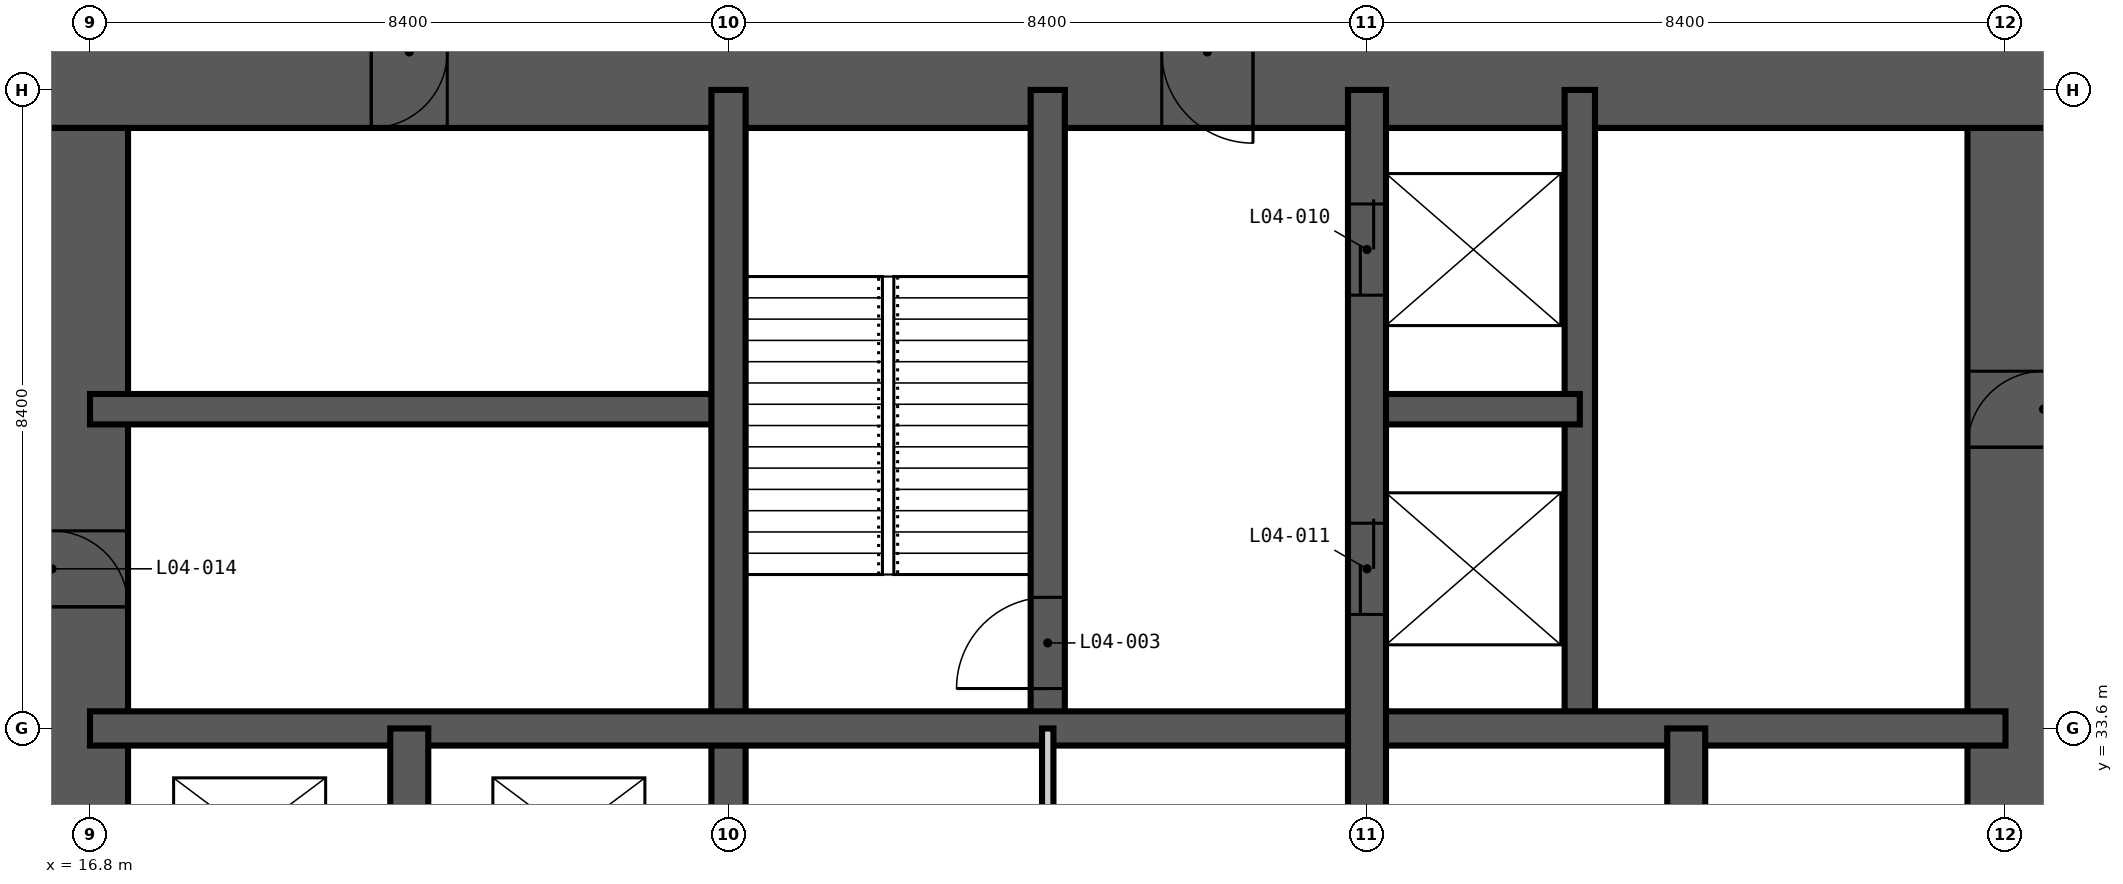
"""IFC4 building model, lengths in metres.
Left out: names, types, materials, properties, quantities, classifications, styles, units other than length and angle.
Written with IfcOpenShell. Run it as: python <this file> out.ifc"""

import sys

from ifc_helpers import new_model, si_unit, direction, frame, frame_2d, origin, place, context, subcontext, project, spatial, rectangle, extrude, element, fill, save


model = new_model("IFC4")
c1 = context("Model", 3, precision=1e-05, world=origin(), true_north=direction((0.0, 1.0)))
c2 = subcontext(c1, "Body", "Model", "MODEL_VIEW")
j1 = project(units=[si_unit("LENGTHUNIT", "METRE"), si_unit("PLANEANGLEUNIT", "RADIAN")], contexts=[c1])
p1 = place(None, origin())
s1 = spatial("IfcSite", under=j1, at=p1, CompositionType="ELEMENT")
p2 = place(p1, origin())
s2 = spatial("IfcBuilding", under=s1, at=p2, CompositionType="ELEMENT")
p3 = place(p2, frame((0.0, 0.0, 22.0)))
s3 = spatial("IfcBuildingStorey", under=s2, at=p3, CompositionType="ELEMENT", Elevation=22.0)
p4 = place(p3, frame((42.5, 17.3, -0.35), z_axis=(0.0, 0.0, 1.0), x_axis=(0.0, 1.0, 0.0)))
e1 = element("IfcWall", 1, at=p4, inside=s3, PredefinedType="SHEAR", context=c2, shape_type="SweptSolid", body=[
    extrude(rectangle(XDim=24.2, YDim=2.0, at=frame_2d((12.1, 0.0))), origin(), (0.0, 0.0, 1.0), 5.0),
])
p5 = place(p4, frame((0.3, 0.0, 0.35)))
e2 = element("IfcOpeningElement", 2, at=p5, cuts=e1, PredefinedType="OPENING", context=c2, shape_type="SweptSolid", body=[
    extrude(rectangle(XDim=1.2, YDim=2.2, at=frame_2d((0.6, 1.1))), frame((0.0, 1.01, 0.0), z_axis=(0.0, -1.0, 0.0), x_axis=(1.0, 0.0, 0.0)), (0.0, 0.0, 1.0), 2.02),
])
p6 = place(p4, frame((11.6, 0.0, 0.35)))
e3 = element("IfcOpeningElement", 3, at=p6, cuts=e1, PredefinedType="OPENING", context=c2, shape_type="SweptSolid", body=[
    extrude(rectangle(XDim=1.0, YDim=2.1, at=frame_2d((0.5, 1.05))), frame((0.0, 1.01, 0.0), z_axis=(0.0, -1.0, 0.0), x_axis=(1.0, 0.0, 0.0)), (0.0, 0.0, 1.0), 2.02),
])
p7 = place(p4, frame((20.0, 0.0, 0.35)))
e4 = element("IfcOpeningElement", 4, at=p7, cuts=e1, PredefinedType="OPENING", context=c2, shape_type="SweptSolid", body=[
    extrude(rectangle(XDim=1.0, YDim=2.1, at=frame_2d((0.5, 1.05))), frame((0.0, 1.01, 0.0), z_axis=(0.0, -1.0, 0.0), x_axis=(1.0, 0.0, 0.0)), (0.0, 0.0, 1.0), 2.02),
])
p8 = place(p3, frame((43.5, 42.5, -0.35), z_axis=(0.0, 0.0, 1.0), x_axis=(-1.0, 0.0, 0.0)))
e5 = element("IfcWall", 5, at=p8, inside=s3, PredefinedType="SHEAR", context=c2, shape_type="SweptSolid", body=[
    extrude(rectangle(XDim=28.2, YDim=2.0, at=frame_2d((14.1, 0.0))), origin(), (0.0, 0.0, 1.0), 5.0),
])
p9 = place(p8, frame((22.0, 0.0, 0.35)))
e6 = element("IfcOpeningElement", 6, at=p9, cuts=e5, PredefinedType="OPENING", context=c2, shape_type="SweptSolid", body=[
    extrude(rectangle(XDim=1.0, YDim=2.1, at=frame_2d((0.5, 1.05))), frame((0.0, 1.01, 0.0), z_axis=(0.0, -1.0, 0.0), x_axis=(1.0, 0.0, 0.0)), (0.0, 0.0, 1.0), 2.02),
])
p10 = place(p8, frame((11.4, 0.0, 0.35)))
e7 = element("IfcOpeningElement", 7, at=p10, cuts=e5, PredefinedType="OPENING", context=c2, shape_type="SweptSolid", body=[
    extrude(rectangle(XDim=1.2, YDim=2.2, at=frame_2d((0.6, 1.1))), frame((0.0, 1.01, 0.0), z_axis=(0.0, -1.0, 0.0), x_axis=(1.0, 0.0, 0.0)), (0.0, 0.0, 1.0), 2.02),
])
p11 = place(p3, frame((16.3, 41.5, -0.35), z_axis=(0.0, 0.0, 1.0), x_axis=(0.0, -1.0, 0.0)))
e8 = element("IfcWall", 8, at=p11, inside=s3, PredefinedType="SHEAR", context=c2, shape_type="SweptSolid", body=[
    extrude(rectangle(XDim=24.2, YDim=2.0, at=frame_2d((12.1, 0.0))), origin(), (0.0, 0.0, 1.0), 5.0),
])
p12 = place(p11, frame((11.2, 0.0, 0.35)))
e9 = element("IfcOpeningElement", 9, at=p12, cuts=e8, PredefinedType="OPENING", context=c2, shape_type="SweptSolid", body=[
    extrude(rectangle(XDim=1.8, YDim=2.2, at=frame_2d((0.9, 1.1))), frame((0.0, 1.01, 0.0), z_axis=(0.0, -1.0, 0.0), x_axis=(1.0, 0.0, 0.0)), (0.0, 0.0, 1.0), 2.02),
])
p13 = place(p11, frame((20.0, 0.0, 0.35)))
e10 = element("IfcOpeningElement", 10, at=p13, cuts=e8, PredefinedType="OPENING", context=c2, shape_type="SweptSolid", body=[
    extrude(rectangle(XDim=1.0, YDim=2.1, at=frame_2d((0.5, 1.05))), frame((0.0, 1.01, 0.0), z_axis=(0.0, -1.0, 0.0), x_axis=(1.0, 0.0, 0.0)), (0.0, 0.0, 1.0), 2.02),
])
p14 = place(p11, frame((5.3, 0.0, 0.35)))
e11 = element("IfcOpeningElement", 11, at=p14, cuts=e8, PredefinedType="OPENING", context=c2, shape_type="SweptSolid", body=[
    extrude(rectangle(XDim=1.0, YDim=2.1, at=frame_2d((0.5, 1.05))), frame((0.0, 1.01, 0.0), z_axis=(0.0, -1.0, 0.0), x_axis=(1.0, 0.0, 0.0)), (0.0, 0.0, 1.0), 2.02),
])
for number, where, z_axis, x_axis in (
    (12, (36.4, 33.6, -0.35), (0.0, 0.0, 1.0), (0.0, 1.0, 0.0)),
    (13, (16.8, 37.8, -0.35), (0.0, 0.0, 1.0), (1.0, 0.0, 0.0)),
):
    element("IfcWall", number, at=place(p3, frame(where, z_axis=z_axis, x_axis=x_axis)), inside=s3, PredefinedType="SHEAR", context=c2, shape_type="SweptSolid", body=[
        extrude(rectangle(XDim=8.4, YDim=0.4, at=frame_2d((4.2, 0.0))), origin(), (0.0, 0.0, 1.0), 5.0),
    ])
p15 = place(p3, frame((33.6, 37.8, -0.35), z_axis=(0.0, 0.0, 1.0), x_axis=(1.0, 0.0, 0.0)))
e14 = element("IfcWall", 14, at=p15, inside=s3, PredefinedType="SHEAR", context=c2, shape_type="SweptSolid", body=[
    extrude(rectangle(XDim=2.8, YDim=0.4, at=frame_2d((1.4, 0.0))), origin(), (0.0, 0.0, 1.0), 5.0),
])
p16 = place(p3, frame((25.2, 16.8, -0.35), z_axis=(0.0, 0.0, 1.0), x_axis=(0.0, 1.0, 0.0)))
e15 = element("IfcWall", 15, at=p16, inside=s3, PredefinedType="SHEAR", context=c2, shape_type="SweptSolid", body=[
    extrude(rectangle(XDim=25.2, YDim=0.45, at=frame_2d((12.6, 0.0))), origin(), (0.0, 0.0, 1.0), 5.0),
])
p17 = place(p3, frame((29.4, 33.6, -0.35), z_axis=(0.0, 0.0, 1.0), x_axis=(0.0, 1.0, 0.0)))
e16 = element("IfcWall", 16, at=p17, inside=s3, PredefinedType="SHEAR", context=c2, shape_type="SweptSolid", body=[
    extrude(rectangle(XDim=8.4, YDim=0.45, at=frame_2d((4.2, 0.0))), origin(), (0.0, 0.0, 1.0), 5.0),
])
p18 = place(p17, frame((0.525, 0.0, 0.35)))
e17 = element("IfcOpeningElement", 17, at=p18, cuts=e16, PredefinedType="OPENING", context=c2, shape_type="SweptSolid", body=[
    extrude(rectangle(XDim=1.2, YDim=2.2, at=frame_2d((0.6, 1.1))), frame((0.0, 0.235, 0.0), z_axis=(0.0, -1.0, 0.0), x_axis=(1.0, 0.0, 0.0)), (0.0, 0.0, 1.0), 0.47),
])
p19 = place(p3, frame((16.8, 33.6, -0.35), z_axis=(0.0, 0.0, 1.0), x_axis=(1.0, 0.0, 0.0)))
e18 = element("IfcWall", 18, at=p19, inside=s3, PredefinedType="SHEAR", context=c2, shape_type="SweptSolid", body=[
    extrude(rectangle(XDim=25.2, YDim=0.45, at=frame_2d((12.6, 0.0))), origin(), (0.0, 0.0, 1.0), 5.0),
])
p20 = place(p3, frame((21.0, 30.8, -0.35), z_axis=(0.0, 0.0, 1.0), x_axis=(0.0, 1.0, 0.0)))
e19 = element("IfcWall", 19, at=p20, inside=s3, PredefinedType="SHEAR", context=c2, shape_type="SweptSolid", body=[
    extrude(rectangle(XDim=2.8, YDim=0.5, at=frame_2d((1.4, 0.0))), origin(), (0.0, 0.0, 1.0), 5.0),
])
p21 = place(p3, frame((33.6, 16.8, -0.35), z_axis=(0.0, 0.0, 1.0), x_axis=(0.0, 1.0, 0.0)))
e20 = element("IfcWall", 20, at=p21, inside=s3, PredefinedType="SHEAR", context=c2, shape_type="SweptSolid", body=[
    extrude(rectangle(XDim=25.2, YDim=0.5, at=frame_2d((12.6, 0.0))), origin(), (0.0, 0.0, 1.0), 5.0),
])
p22 = place(p21, frame((22.5, 0.0, 0.35)))
e21 = element("IfcOpeningElement", 21, at=p22, cuts=e20, PredefinedType="OPENING", context=c2, shape_type="SweptSolid", body=[
    extrude(rectangle(XDim=1.2, YDim=2.2, at=frame_2d((0.6, 1.1))), frame((0.0, 0.26, 0.0), z_axis=(0.0, -1.0, 0.0), x_axis=(1.0, 0.0, 0.0)), (0.0, 0.0, 1.0), 0.52),
])
p23 = place(p21, frame((18.3, 0.0, 0.35)))
e22 = element("IfcOpeningElement", 22, at=p23, cuts=e20, PredefinedType="OPENING", context=c2, shape_type="SweptSolid", body=[
    extrude(rectangle(XDim=1.2, YDim=2.2, at=frame_2d((0.6, 1.1))), frame((0.0, 0.26, 0.0), z_axis=(0.0, -1.0, 0.0), x_axis=(1.0, 0.0, 0.0)), (0.0, 0.0, 1.0), 0.52),
])
p24 = place(p21, frame((12.1, 0.0, 0.35)))
e23 = element("IfcOpeningElement", 23, at=p24, cuts=e20, PredefinedType="OPENING", context=c2, shape_type="SweptSolid", body=[
    extrude(rectangle(XDim=1.0, YDim=2.1, at=frame_2d((0.5, 1.05))), frame((0.0, 0.26, 0.0), z_axis=(0.0, -1.0, 0.0), x_axis=(1.0, 0.0, 0.0)), (0.0, 0.0, 1.0), 0.52),
])
p25 = place(p3, frame((37.8, 30.8, -0.35), z_axis=(0.0, 0.0, 1.0), x_axis=(0.0, 1.0, 0.0)))
e24 = element("IfcWall", 24, at=p25, inside=s3, PredefinedType="SHEAR", context=c2, shape_type="SweptSolid", body=[
    extrude(rectangle(XDim=2.8, YDim=0.5, at=frame_2d((1.4, 0.0))), origin(), (0.0, 0.0, 1.0), 5.0),
])
p26 = place(p3, frame((29.4, 25.2, 0.0), z_axis=(0.0, 0.0, 1.0), x_axis=(0.0, 1.0, 0.0)))
e25 = element("IfcWall", 25, at=p26, inside=s3, PredefinedType="PARTITIONING", context=c2, shape_type="SweptSolid", body=[
    extrude(rectangle(XDim=8.4, YDim=0.15, at=frame_2d((4.2, 0.0))), origin(), (0.0, 0.0, 1.0), 4.65),
])
p27 = place(p26, frame((3.7, 0.0, 0.0)))
e26 = element("IfcOpeningElement", 26, at=p27, cuts=e25, PredefinedType="OPENING", context=c2, shape_type="SweptSolid", body=[
    extrude(rectangle(XDim=1.0, YDim=2.1, at=frame_2d((0.5, 1.05))), frame((0.0, 0.085, 0.0), z_axis=(0.0, -1.0, 0.0), x_axis=(1.0, 0.0, 0.0)), (0.0, 0.0, 1.0), 0.17),
])
p28 = place(p18, origin())
e27 = element("IfcDoor", 27, at=p28, inside=s3, OperationType="SINGLE_SWING_LEFT", PredefinedType="DOOR", context=c2, shape_type="SweptSolid", body=[
    extrude(rectangle(XDim=1.2, YDim=2.2, at=frame_2d((0.6, 1.1))), frame((0.0, 0.025, 0.0), z_axis=(0.0, -1.0, 0.0), x_axis=(1.0, 0.0, 0.0)), (0.0, 0.0, 1.0), 0.05),
])
fill(e17, e27)
p29 = place(p22, origin())
e28 = element("IfcDoor", 28, at=p29, inside=s3, OperationType="DOUBLE_DOOR_SLIDING", PredefinedType="DOOR", context=c2, shape_type="SweptSolid", body=[
    extrude(rectangle(XDim=1.2, YDim=2.2, at=frame_2d((0.6, 1.1))), frame((0.0, 0.025, 0.0), z_axis=(0.0, -1.0, 0.0), x_axis=(1.0, 0.0, 0.0)), (0.0, 0.0, 1.0), 0.05),
])
fill(e21, e28)
p30 = place(p23, origin())
e29 = element("IfcDoor", 29, at=p30, inside=s3, OperationType="DOUBLE_DOOR_SLIDING", PredefinedType="DOOR", context=c2, shape_type="SweptSolid", body=[
    extrude(rectangle(XDim=1.2, YDim=2.2, at=frame_2d((0.6, 1.1))), frame((0.0, 0.025, 0.0), z_axis=(0.0, -1.0, 0.0), x_axis=(1.0, 0.0, 0.0)), (0.0, 0.0, 1.0), 0.05),
])
fill(e22, e29)
p31 = place(p14, origin())
e30 = element("IfcDoor", 30, at=p31, inside=s3, OperationType="SINGLE_SWING_RIGHT", PredefinedType="DOOR", context=c2, shape_type="SweptSolid", body=[
    extrude(rectangle(XDim=1.0, YDim=2.1, at=frame_2d((0.5, 1.05))), frame((0.0, 0.025, 0.0), z_axis=(0.0, -1.0, 0.0), x_axis=(1.0, 0.0, 0.0)), (0.0, 0.0, 1.0), 0.05),
])
fill(e11, e30)
p32 = place(p9, origin())
e31 = element("IfcDoor", 31, at=p32, inside=s3, OperationType="SINGLE_SWING_RIGHT", PredefinedType="DOOR", context=c2, shape_type="SweptSolid", body=[
    extrude(rectangle(XDim=1.0, YDim=2.1, at=frame_2d((0.5, 1.05))), frame((0.0, 0.025, 0.0), z_axis=(0.0, -1.0, 0.0), x_axis=(1.0, 0.0, 0.0)), (0.0, 0.0, 1.0), 0.05),
])
fill(e6, e31)
p33 = place(p10, origin())
e32 = element("IfcDoor", 32, at=p33, inside=s3, OperationType="SINGLE_SWING_LEFT", PredefinedType="DOOR", context=c2, shape_type="SweptSolid", body=[
    extrude(rectangle(XDim=1.2, YDim=2.2, at=frame_2d((0.6, 1.1))), frame((0.0, 0.025, 0.0), z_axis=(0.0, -1.0, 0.0), x_axis=(1.0, 0.0, 0.0)), (0.0, 0.0, 1.0), 0.05),
])
fill(e7, e32)
p34 = place(p7, origin())
e33 = element("IfcDoor", 33, at=p34, inside=s3, OperationType="SINGLE_SWING_LEFT", PredefinedType="DOOR", context=c2, shape_type="SweptSolid", body=[
    extrude(rectangle(XDim=1.0, YDim=2.1, at=frame_2d((0.5, 1.05))), frame((0.0, 0.025, 0.0), z_axis=(0.0, -1.0, 0.0), x_axis=(1.0, 0.0, 0.0)), (0.0, 0.0, 1.0), 0.05),
])
fill(e4, e33)
save(model, sys.argv[1])
